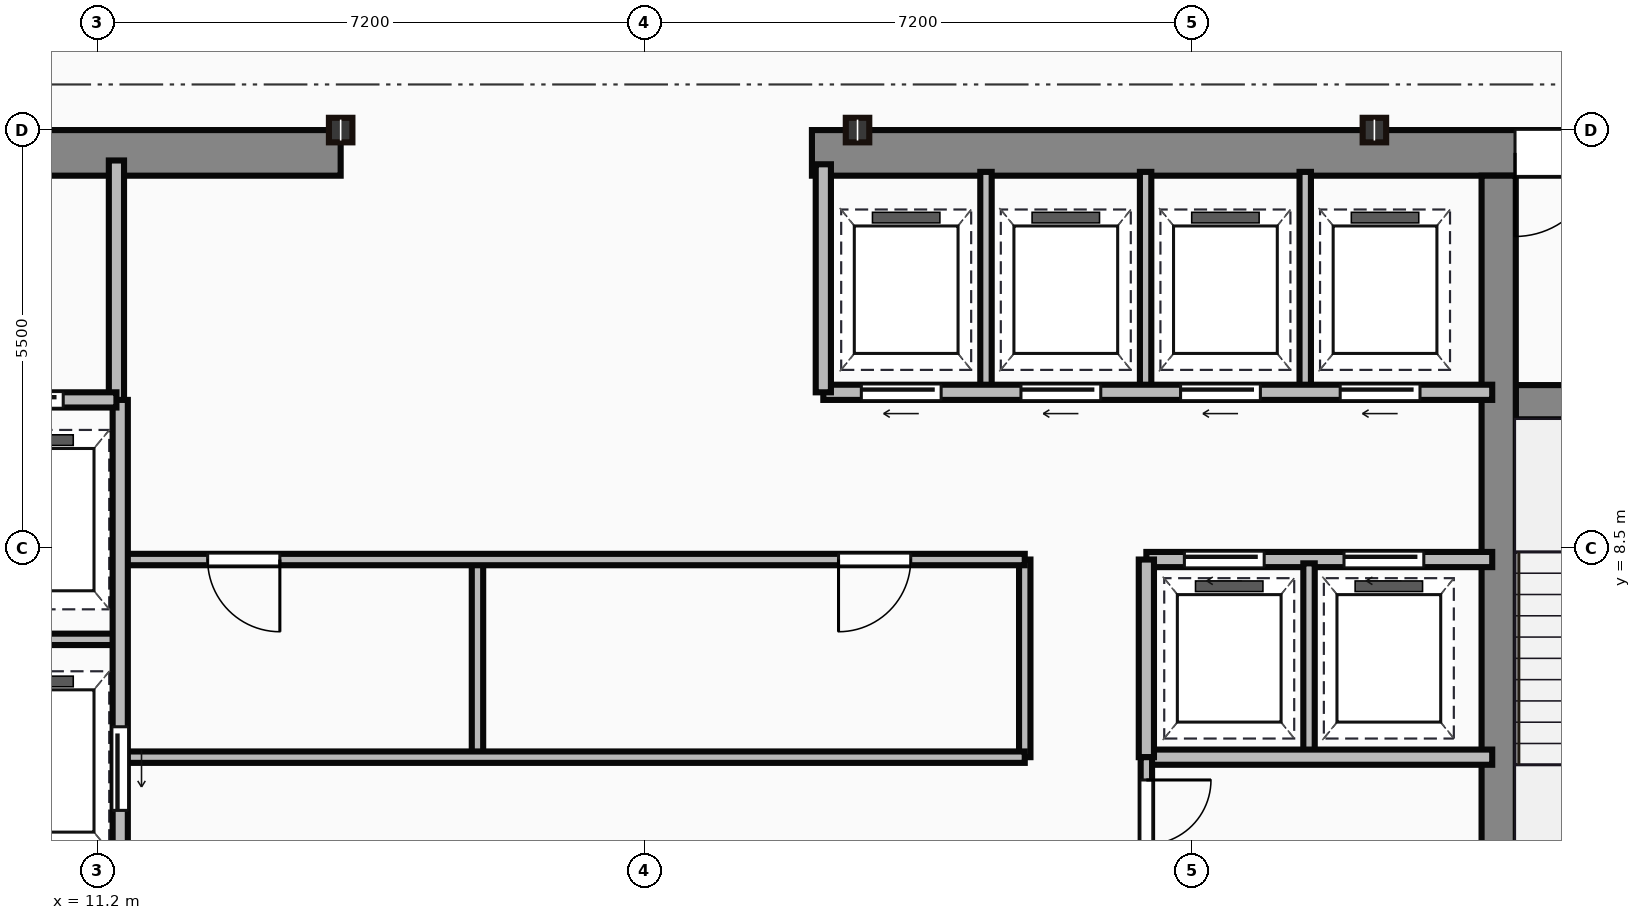
"""IFC4 building model, lengths in metres.
Left out: names, types, materials, properties, quantities, classifications, styles, units other than length and angle.
Written with IfcOpenShell. Run it as: python <this file> out.ifc"""

import sys

from ifc_helpers import new_model, si_unit, direction, frame, frame_2d, origin, origin_2d, place, context, subcontext, project, spatial, rectangle, i_section, extrude, source, transform, mapped, element, fill, save


model = new_model("IFC4")
c1 = context("Model", 3, precision=1e-05, world=origin(), true_north=direction((0.0, 1.0)))
c2 = subcontext(c1, "Body", "Model", "MODEL_VIEW")
j1 = project(units=[si_unit("LENGTHUNIT", "METRE"), si_unit("PLANEANGLEUNIT", "RADIAN")], contexts=[c1])
p1 = place(None, origin())
s1 = spatial("IfcSite", under=j1, at=p1, CompositionType="ELEMENT")
p2 = place(p1, origin())
s2 = spatial("IfcBuilding", under=s1, at=p2, CompositionType="ELEMENT")
p3 = place(p2, frame((0.0, 0.0, 199.55)))
s3 = spatial("IfcBuildingStorey", under=s2, at=p3, CompositionType="ELEMENT", Elevation=199.55)
m1 = source(origin(), c2, "Body", "SweptSolid", [
    extrude(rectangle(XDim=9.1, YDim=0.6, at=frame_2d((4.55, 0.0))), origin(), (0.0, 0.0, 1.0), 3.65),
])
p4 = place(p3, frame((5.3, 13.7, 0.0), z_axis=(0.0, 0.0, 1.0), x_axis=(1.0, 0.0, 0.0)))
e1 = element("IfcWall", 1, at=p4, inside=s3, PredefinedType="SHEAR", context=c2, shape_type="MappedRepresentation", body=[
    mapped(m1, transform((0.0, 0.0, 0.0))),
])
p5 = place(p4, frame((4.1, 0.0, 0.0)))
e2 = element("IfcOpeningElement", 2, at=p5, cuts=e1, PredefinedType="OPENING", context=c2, shape_type="SweptSolid", body=[
    extrude(rectangle(XDim=1.1, YDim=2.15, at=frame_2d((0.55, 1.075))), frame((0.0, 0.31, 0.0), z_axis=(0.0, -1.0, 0.0), x_axis=(1.0, 0.0, 0.0)), (0.0, 0.0, 1.0), 0.62),
])
m2 = source(origin(), c2, "Body", "SweptSolid", [
    extrude(rectangle(XDim=12.6, YDim=0.6, at=frame_2d((6.3, 0.0))), origin(), (0.0, 0.0, 1.0), 3.65),
])
p6 = place(p3, frame((20.6, 13.7, 0.0), z_axis=(0.0, 0.0, 1.0), x_axis=(1.0, 0.0, 0.0)))
e3 = element("IfcWall", 3, at=p6, inside=s3, PredefinedType="SHEAR", context=c2, shape_type="MappedRepresentation", body=[
    mapped(m2, transform((0.0, 0.0, 0.0))),
])
p7 = place(p6, frame((9.25, 0.0, 0.0)))
e4 = element("IfcOpeningElement", 4, at=p7, cuts=e3, PredefinedType="OPENING", context=c2, shape_type="SweptSolid", body=[
    extrude(rectangle(XDim=1.1, YDim=2.15, at=frame_2d((0.55, 1.075))), frame((0.0, 0.31, 0.0), z_axis=(0.0, -1.0, 0.0), x_axis=(1.0, 0.0, 0.0)), (0.0, 0.0, 1.0), 0.62),
])
m3 = source(origin(), c2, "Body", "SweptSolid", [
    extrude(rectangle(XDim=12.5, YDim=0.45, at=frame_2d((6.25, 0.0))), origin(), (0.0, 0.0, 1.0), 3.65),
])
p8 = place(p3, frame((29.635, 0.9, 0.0), z_axis=(0.0, 0.0, 1.0), x_axis=(0.0, 1.0, 0.0)))
e5 = element("IfcWall", 5, at=p8, inside=s3, PredefinedType="SHEAR", context=c2, shape_type="MappedRepresentation", body=[
    mapped(m3, transform((0.0, 0.0, 0.0))),
])
m4 = source(origin(), c2, "Body", "SweptSolid", [
    extrude(rectangle(XDim=3.39, YDim=0.45, at=frame_2d((1.695, 0.0))), origin(), (0.0, 0.0, 1.0), 3.65),
])
p9 = place(p3, frame((29.86, 10.42, 0.0), z_axis=(0.0, 0.0, 1.0), x_axis=(1.0, 0.0, 0.0)))
e6 = element("IfcWall", 6, at=p9, inside=s3, PredefinedType="SHEAR", context=c2, shape_type="MappedRepresentation", body=[
    mapped(m4, transform((0.0, 0.0, 0.0))),
])
p10 = place(p9, frame((1.1, 0.0, 0.0)))
e7 = element("IfcOpeningElement", 7, at=p10, cuts=e6, PredefinedType="OPENING", context=c2, shape_type="SweptSolid", body=[
    extrude(rectangle(XDim=1.1, YDim=2.15, at=frame_2d((0.55, 1.075))), frame((0.0, 0.235, 0.0), z_axis=(0.0, -1.0, 0.0), x_axis=(1.0, 0.0, 0.0)), (0.0, 0.0, 1.0), 0.47),
])
m5 = source(origin(), c2, "Body", "SweptSolid", [
    extrude(i_section(OverallWidth=0.309, OverallDepth=0.323, WebThickness=0.014, FlangeThickness=0.023, at=origin_2d()), origin(), (0.0, 0.0, 1.0), 3.65),
])
for number, where, z_axis, x_axis in (
    (8, (14.4, 14.0, 0.0), (0.0, 0.0, 1.0), (1.0, 0.0, 0.0)),
    (9, (21.2, 14.0, 0.0), (0.0, 0.0, 1.0), (1.0, 0.0, 0.0)),
    (10, (28.0, 14.0, 0.0), (0.0, 0.0, 1.0), (1.0, 0.0, 0.0)),
):
    element("IfcColumn", number, at=place(p3, frame(where, z_axis=z_axis, x_axis=x_axis)), inside=s3, PredefinedType="COLUMN", context=c2, shape_type="MappedRepresentation", body=[
        mapped(m5, transform((0.0, 0.0, 0.0))),
    ])
m6 = source(origin(), c2, "Body", "SweptSolid", [
    extrude(rectangle(XDim=3.18, YDim=0.2, at=frame_2d((1.59, 0.0))), origin(), (0.0, 0.0, 1.0), 3.4),
])
p11 = place(p3, frame((11.45, 10.42, 0.0), z_axis=(0.0, 0.0, 1.0), x_axis=(0.0, 1.0, 0.0)))
e11 = element("IfcWall", 11, at=p11, inside=s3, PredefinedType="PARTITIONING", context=c2, shape_type="MappedRepresentation", body=[
    mapped(m6, transform((0.0, 0.0, 0.0))),
])
m7 = source(origin(), c2, "Body", "SweptSolid", [
    extrude(rectangle(XDim=2.35, YDim=0.2, at=frame_2d((1.175, 0.0))), origin(), (0.0, 0.0, 1.0), 3.4),
])
p12 = place(p3, frame((9.1, 10.45, 0.0), z_axis=(0.0, 0.0, 1.0), x_axis=(1.0, 0.0, 0.0)))
e12 = element("IfcWall", 12, at=p12, inside=s3, PredefinedType="PARTITIONING", context=c2, shape_type="MappedRepresentation", body=[
    mapped(m7, transform((0.0, 0.0, 0.0))),
])
p13 = place(p12, frame((0.55, 0.0, 0.0)))
e13 = element("IfcOpeningElement", 13, at=p13, cuts=e12, PredefinedType="OPENING", context=c2, shape_type="SweptSolid", body=[
    extrude(rectangle(XDim=1.1, YDim=2.15, at=frame_2d((0.55, 1.075))), frame((0.0, 0.11, 0.0), z_axis=(0.0, -1.0, 0.0), x_axis=(1.0, 0.0, 0.0)), (0.0, 0.0, 1.0), 0.22),
])
m8 = source(origin(), c2, "Body", "SweptSolid", [
    extrude(rectangle(XDim=9.6, YDim=0.2, at=frame_2d((4.8, 0.0))), origin(), (0.0, 0.0, 1.0), 3.4),
])
p14 = place(p3, frame((11.5, 0.85, 0.0), z_axis=(0.0, 0.0, 1.0), x_axis=(0.0, 1.0, 0.0)))
e14 = element("IfcWall", 14, at=p14, inside=s3, PredefinedType="PARTITIONING", context=c2, shape_type="MappedRepresentation", body=[
    mapped(m8, transform((0.0, 0.0, 0.0))),
])
p15 = place(p14, frame((4.2, 0.0, 0.0)))
e15 = element("IfcOpeningElement", 15, at=p15, cuts=e14, PredefinedType="OPENING", context=c2, shape_type="SweptSolid", body=[
    extrude(rectangle(XDim=1.1, YDim=2.15, at=frame_2d((0.55, 1.075))), frame((0.0, 0.11, 0.0), z_axis=(0.0, -1.0, 0.0), x_axis=(1.0, 0.0, 0.0)), (0.0, 0.0, 1.0), 0.22),
])
p16 = place(p14, frame((0.9, 0.0, 0.0)))
e16 = element("IfcOpeningElement", 16, at=p16, cuts=e14, PredefinedType="OPENING", context=c2, shape_type="SweptSolid", body=[
    extrude(rectangle(XDim=1.2, YDim=2.15, at=frame_2d((0.6, 1.075))), frame((0.0, 0.11, 0.0), z_axis=(0.0, -1.0, 0.0), x_axis=(1.0, 0.0, 0.0)), (0.0, 0.0, 1.0), 0.22),
])
m9 = source(origin(), c2, "Body", "SweptSolid", [
    extrude(rectangle(XDim=2.4, YDim=0.15, at=frame_2d((1.2, 0.0))), origin(), (0.0, 0.0, 1.0), 3.4),
])
p17 = place(p3, frame((9.1, 7.3, 0.0), z_axis=(0.0, 0.0, 1.0), x_axis=(1.0, 0.0, 0.0)))
e17 = element("IfcWall", 17, at=p17, inside=s3, PredefinedType="PARTITIONING", context=c2, shape_type="MappedRepresentation", body=[
    mapped(m9, transform((0.0, 0.0, 0.0))),
])
m10 = source(origin(), c2, "Body", "SweptSolid", [
    extrude(rectangle(XDim=11.85, YDim=0.15, at=frame_2d((5.925, 0.0))), origin(), (0.0, 0.0, 1.0), 3.4),
])
p18 = place(p3, frame((11.55, 5.75, 0.0), z_axis=(0.0, 0.0, 1.0), x_axis=(1.0, 0.0, 0.0)))
e18 = element("IfcWall", 18, at=p18, inside=s3, PredefinedType="PARTITIONING", context=c2, shape_type="MappedRepresentation", body=[
    mapped(m10, transform((0.0, 0.0, 0.0))),
])
p19 = place(p3, frame((11.55, 8.35, 0.0), z_axis=(0.0, 0.0, 1.0), x_axis=(1.0, 0.0, 0.0)))
e19 = element("IfcWall", 19, at=p19, inside=s3, PredefinedType="PARTITIONING", context=c2, shape_type="MappedRepresentation", body=[
    mapped(m10, transform((0.0, 0.0, 0.0))),
])
p20 = place(p19, frame((1.1, 0.0, 0.0)))
e20 = element("IfcOpeningElement", 20, at=p20, cuts=e19, PredefinedType="OPENING", context=c2, shape_type="SweptSolid", body=[
    extrude(rectangle(XDim=0.95, YDim=2.15, at=frame_2d((0.475, 1.075))), frame((0.0, 0.085, 0.0), z_axis=(0.0, -1.0, 0.0), x_axis=(1.0, 0.0, 0.0)), (0.0, 0.0, 1.0), 0.17),
])
p21 = place(p19, frame((9.4, 0.0, 0.0)))
e21 = element("IfcOpeningElement", 21, at=p21, cuts=e19, PredefinedType="OPENING", context=c2, shape_type="SweptSolid", body=[
    extrude(rectangle(XDim=0.95, YDim=2.15, at=frame_2d((0.475, 1.075))), frame((0.0, 0.085, 0.0), z_axis=(0.0, -1.0, 0.0), x_axis=(1.0, 0.0, 0.0)), (0.0, 0.0, 1.0), 0.17),
])
m11 = source(origin(), c2, "Body", "SweptSolid", [
    extrude(rectangle(XDim=2.6, YDim=0.15, at=frame_2d((1.3, 0.0))), origin(), (0.0, 0.0, 1.0), 3.4),
])
p22 = place(p3, frame((23.4, 5.75, 0.0), z_axis=(0.0, 0.0, 1.0), x_axis=(0.0, 1.0, 0.0)))
e22 = element("IfcWall", 22, at=p22, inside=s3, PredefinedType="PARTITIONING", context=c2, shape_type="MappedRepresentation", body=[
    mapped(m11, transform((0.0, 0.0, 0.0))),
])
m12 = source(origin(), c2, "Body", "SweptSolid", [
    extrude(rectangle(XDim=2.5, YDim=0.15, at=frame_2d((1.25, 0.0))), origin(), (0.0, 0.0, 1.0), 3.4),
])
p23 = place(p3, frame((16.2, 5.8, 0.0), z_axis=(0.0, 0.0, 1.0), x_axis=(0.0, 1.0, 0.0)))
e23 = element("IfcWall", 23, at=p23, inside=s3, PredefinedType="PARTITIONING", context=c2, shape_type="MappedRepresentation", body=[
    mapped(m12, transform((0.0, 0.0, 0.0))),
])
m13 = source(origin(), c2, "Body", "SweptSolid", [
    extrude(rectangle(XDim=8.8, YDim=0.2, at=frame_2d((4.4, 0.0))), origin(), (0.0, 0.0, 1.0), 3.4),
])
p24 = place(p3, frame((20.75, 10.55, 0.0), z_axis=(0.0, 0.0, 1.0), x_axis=(1.0, 0.0, 0.0)))
e24 = element("IfcWall", 24, at=p24, inside=s3, PredefinedType="PARTITIONING", context=c2, shape_type="MappedRepresentation", body=[
    mapped(m13, transform((0.0, 0.0, 0.0))),
])
p25 = place(p24, frame((0.5, 0.0, 0.0)))
e25 = element("IfcOpeningElement", 25, at=p25, cuts=e24, PredefinedType="OPENING", context=c2, shape_type="SweptSolid", body=[
    extrude(rectangle(XDim=1.05, YDim=2.15, at=frame_2d((0.525, 1.075))), frame((0.0, 0.11, 0.0), z_axis=(0.0, -1.0, 0.0), x_axis=(1.0, 0.0, 0.0)), (0.0, 0.0, 1.0), 0.22),
])
p26 = place(p24, frame((2.6, 0.0, 0.0)))
e26 = element("IfcOpeningElement", 26, at=p26, cuts=e24, PredefinedType="OPENING", context=c2, shape_type="SweptSolid", body=[
    extrude(rectangle(XDim=1.05, YDim=2.15, at=frame_2d((0.525, 1.075))), frame((0.0, 0.11, 0.0), z_axis=(0.0, -1.0, 0.0), x_axis=(1.0, 0.0, 0.0)), (0.0, 0.0, 1.0), 0.22),
])
p27 = place(p24, frame((4.7, 0.0, 0.0)))
e27 = element("IfcOpeningElement", 27, at=p27, cuts=e24, PredefinedType="OPENING", context=c2, shape_type="SweptSolid", body=[
    extrude(rectangle(XDim=1.05, YDim=2.15, at=frame_2d((0.525, 1.075))), frame((0.0, 0.11, 0.0), z_axis=(0.0, -1.0, 0.0), x_axis=(1.0, 0.0, 0.0)), (0.0, 0.0, 1.0), 0.22),
])
p28 = place(p24, frame((6.8, 0.0, 0.0)))
e28 = element("IfcOpeningElement", 28, at=p28, cuts=e24, PredefinedType="OPENING", context=c2, shape_type="SweptSolid", body=[
    extrude(rectangle(XDim=1.05, YDim=2.15, at=frame_2d((0.525, 1.075))), frame((0.0, 0.11, 0.0), z_axis=(0.0, -1.0, 0.0), x_axis=(1.0, 0.0, 0.0)), (0.0, 0.0, 1.0), 0.22),
])
m14 = source(origin(), c2, "Body", "SweptSolid", [
    extrude(rectangle(XDim=3.0, YDim=0.2, at=frame_2d((1.5, 0.0))), origin(), (0.0, 0.0, 1.0), 3.4),
])
p29 = place(p3, frame((20.75, 10.55, 0.0), z_axis=(0.0, 0.0, 1.0), x_axis=(0.0, 1.0, 0.0)))
e29 = element("IfcWall", 29, at=p29, inside=s3, PredefinedType="PARTITIONING", context=c2, shape_type="MappedRepresentation", body=[
    mapped(m14, transform((0.0, 0.0, 0.0))),
])
m15 = source(origin(), c2, "Body", "SweptSolid", [
    extrude(rectangle(XDim=2.85, YDim=0.15, at=frame_2d((1.425, 0.0))), origin(), (0.0, 0.0, 1.0), 3.4),
])
for number, where, z_axis, x_axis in (
    (30, (22.89, 10.6, 0.0), (0.0, 0.0, 1.0), (0.0, 1.0, 0.0)),
    (31, (24.99, 10.6, 0.0), (0.0, 0.0, 1.0), (0.0, 1.0, 0.0)),
    (32, (27.09, 10.6, 0.0), (0.0, 0.0, 1.0), (0.0, 1.0, 0.0)),
):
    element("IfcWall", number, at=place(p3, frame(where, z_axis=z_axis, x_axis=x_axis)), inside=s3, PredefinedType="PARTITIONING", context=c2, shape_type="MappedRepresentation", body=[
        mapped(m15, transform((0.0, 0.0, 0.0))),
    ])
m16 = source(origin(), c2, "Body", "SweptSolid", [
    extrude(rectangle(XDim=4.55, YDim=0.2, at=frame_2d((2.275, 0.0))), origin(), (0.0, 0.0, 1.0), 3.4),
])
p30 = place(p3, frame((25.0, 8.35, 0.0), z_axis=(0.0, 0.0, 1.0), x_axis=(1.0, 0.0, 0.0)))
e33 = element("IfcWall", 33, at=p30, inside=s3, PredefinedType="PARTITIONING", context=c2, shape_type="MappedRepresentation", body=[
    mapped(m16, transform((0.0, 0.0, 0.0))),
])
p31 = place(p30, frame((0.5, 0.0, 0.0)))
e34 = element("IfcOpeningElement", 34, at=p31, cuts=e33, PredefinedType="OPENING", context=c2, shape_type="SweptSolid", body=[
    extrude(rectangle(XDim=1.05, YDim=2.15, at=frame_2d((0.525, 1.075))), frame((0.0, 0.11, 0.0), z_axis=(0.0, -1.0, 0.0), x_axis=(1.0, 0.0, 0.0)), (0.0, 0.0, 1.0), 0.22),
])
p32 = place(p30, frame((2.6, 0.0, 0.0)))
e35 = element("IfcOpeningElement", 35, at=p32, cuts=e33, PredefinedType="OPENING", context=c2, shape_type="SweptSolid", body=[
    extrude(rectangle(XDim=1.05, YDim=2.15, at=frame_2d((0.525, 1.075))), frame((0.0, 0.11, 0.0), z_axis=(0.0, -1.0, 0.0), x_axis=(1.0, 0.0, 0.0)), (0.0, 0.0, 1.0), 0.22),
])
p33 = place(p3, frame((25.0, 5.75, 0.0), z_axis=(0.0, 0.0, 1.0), x_axis=(1.0, 0.0, 0.0)))
e36 = element("IfcWall", 36, at=p33, inside=s3, PredefinedType="PARTITIONING", context=c2, shape_type="MappedRepresentation", body=[
    mapped(m16, transform((0.0, 0.0, 0.0))),
])
m17 = source(origin(), c2, "Body", "SweptSolid", [
    extrude(rectangle(XDim=2.6, YDim=0.2, at=frame_2d((1.3, 0.0))), origin(), (0.0, 0.0, 1.0), 3.4),
])
p34 = place(p3, frame((25.0, 5.75, 0.0), z_axis=(0.0, 0.0, 1.0), x_axis=(0.0, 1.0, 0.0)))
e37 = element("IfcWall", 37, at=p34, inside=s3, PredefinedType="PARTITIONING", context=c2, shape_type="MappedRepresentation", body=[
    mapped(m17, transform((0.0, 0.0, 0.0))),
])
p35 = place(p3, frame((27.14, 5.8, 0.0), z_axis=(0.0, 0.0, 1.0), x_axis=(0.0, 1.0, 0.0)))
e38 = element("IfcWall", 38, at=p35, inside=s3, PredefinedType="PARTITIONING", context=c2, shape_type="MappedRepresentation", body=[
    mapped(m12, transform((0.0, 0.0, 0.0))),
])
m18 = source(origin(), c2, "Body", "SweptSolid", [
    extrude(rectangle(XDim=4.9, YDim=0.15, at=frame_2d((2.45, 0.0))), origin(), (0.0, 0.0, 1.0), 3.4),
])
p36 = place(p3, frame((25.0, 0.85, 0.0), z_axis=(0.0, 0.0, 1.0), x_axis=(0.0, 1.0, 0.0)))
e39 = element("IfcWall", 39, at=p36, inside=s3, PredefinedType="PARTITIONING", context=c2, shape_type="MappedRepresentation", body=[
    mapped(m18, transform((0.0, 0.0, 0.0))),
])
p37 = place(p36, frame((2.0, 0.0, 0.0)))
e40 = element("IfcOpeningElement", 40, at=p37, cuts=e39, PredefinedType="OPENING", context=c2, shape_type="SweptSolid", body=[
    extrude(rectangle(XDim=0.95, YDim=2.15, at=frame_2d((0.475, 1.075))), frame((0.0, 0.085, 0.0), z_axis=(0.0, -1.0, 0.0), x_axis=(1.0, 0.0, 0.0)), (0.0, 0.0, 1.0), 0.17),
])
p38 = place(p36, frame((3.75, 0.0, 0.0)))
e41 = element("IfcOpeningElement", 41, at=p38, cuts=e39, PredefinedType="OPENING", context=c2, shape_type="SweptSolid", body=[
    extrude(rectangle(XDim=0.85, YDim=2.15, at=frame_2d((0.425, 1.075))), frame((0.0, 0.085, 0.0), z_axis=(0.0, -1.0, 0.0), x_axis=(1.0, 0.0, 0.0)), (0.0, 0.0, 1.0), 0.17),
])
m19 = source(origin(), c2, "Body", "SweptSolid", [
    extrude(rectangle(XDim=1.1, YDim=2.15, at=frame_2d((0.55, 1.075))), frame((0.0, 0.025, 0.0), z_axis=(0.0, -1.0, 0.0), x_axis=(1.0, 0.0, 0.0)), (0.0, 0.0, 1.0), 0.05),
])
p39 = place(p7, origin())
e42 = element("IfcDoor", 42, at=p39, inside=s3, OperationType="SINGLE_SWING_LEFT", PredefinedType="DOOR", context=c2, shape_type="MappedRepresentation", body=[
    mapped(m19, transform((0.0, 0.0, 0.0))),
])
fill(e4, e42)
p40 = place(p13, origin())
e43 = element("IfcDoor", 43, at=p40, inside=s3, OperationType="SLIDING_TO_LEFT", PredefinedType="DOOR", context=c2, shape_type="MappedRepresentation", body=[
    mapped(m19, transform((0.0, 0.0, 0.0))),
])
fill(e13, e43)
p41 = place(p15, frame((1.1, 0.0, 0.0), z_axis=(0.0, 0.0, 1.0), x_axis=(-1.0, 0.0, 0.0)))
e44 = element("IfcDoor", 44, at=p41, inside=s3, OperationType="SLIDING_TO_LEFT", PredefinedType="DOOR", context=c2, shape_type="MappedRepresentation", body=[
    mapped(m19, transform((0.0, 0.0, 0.0))),
])
fill(e15, e44)
m20 = source(origin(), c2, "Body", "SweptSolid", [
    extrude(rectangle(XDim=0.95, YDim=2.15, at=frame_2d((0.475, 1.075))), frame((0.0, 0.025, 0.0), z_axis=(0.0, -1.0, 0.0), x_axis=(1.0, 0.0, 0.0)), (0.0, 0.0, 1.0), 0.05),
])
p42 = place(p20, origin())
e45 = element("IfcDoor", 45, at=p42, inside=s3, OperationType="SINGLE_SWING_RIGHT", PredefinedType="DOOR", context=c2, shape_type="MappedRepresentation", body=[
    mapped(m20, transform((0.0, 0.0, 0.0))),
])
fill(e20, e45)
p43 = place(p21, origin())
e46 = element("IfcDoor", 46, at=p43, inside=s3, OperationType="SINGLE_SWING_LEFT", PredefinedType="DOOR", context=c2, shape_type="MappedRepresentation", body=[
    mapped(m20, transform((0.0, 0.0, 0.0))),
])
fill(e21, e46)
m21 = source(origin(), c2, "Body", "SweptSolid", [
    extrude(rectangle(XDim=1.05, YDim=2.15, at=frame_2d((0.525, 1.075))), frame((0.0, 0.025, 0.0), z_axis=(0.0, -1.0, 0.0), x_axis=(1.0, 0.0, 0.0)), (0.0, 0.0, 1.0), 0.05),
])
p44 = place(p25, frame((1.05, 0.0, 0.0), z_axis=(0.0, 0.0, 1.0), x_axis=(-1.0, 0.0, 0.0)))
e47 = element("IfcDoor", 47, at=p44, inside=s3, OperationType="SLIDING_TO_LEFT", PredefinedType="DOOR", context=c2, shape_type="MappedRepresentation", body=[
    mapped(m21, transform((0.0, 0.0, 0.0))),
])
fill(e25, e47)
p45 = place(p26, frame((1.05, 0.0, 0.0), z_axis=(0.0, 0.0, 1.0), x_axis=(-1.0, 0.0, 0.0)))
e48 = element("IfcDoor", 48, at=p45, inside=s3, OperationType="SLIDING_TO_LEFT", PredefinedType="DOOR", context=c2, shape_type="MappedRepresentation", body=[
    mapped(m21, transform((0.0, 0.0, 0.0))),
])
fill(e26, e48)
p46 = place(p27, frame((1.05, 0.0, 0.0), z_axis=(0.0, 0.0, 1.0), x_axis=(-1.0, 0.0, 0.0)))
e49 = element("IfcDoor", 49, at=p46, inside=s3, OperationType="SLIDING_TO_LEFT", PredefinedType="DOOR", context=c2, shape_type="MappedRepresentation", body=[
    mapped(m21, transform((0.0, 0.0, 0.0))),
])
fill(e27, e49)
p47 = place(p28, frame((1.05, 0.0, 0.0), z_axis=(0.0, 0.0, 1.0), x_axis=(-1.0, 0.0, 0.0)))
e50 = element("IfcDoor", 50, at=p47, inside=s3, OperationType="SLIDING_TO_LEFT", PredefinedType="DOOR", context=c2, shape_type="MappedRepresentation", body=[
    mapped(m21, transform((0.0, 0.0, 0.0))),
])
fill(e28, e50)
p48 = place(p31, origin())
e51 = element("IfcDoor", 51, at=p48, inside=s3, OperationType="SLIDING_TO_LEFT", PredefinedType="DOOR", context=c2, shape_type="MappedRepresentation", body=[
    mapped(m21, transform((0.0, 0.0, 0.0))),
])
fill(e34, e51)
p49 = place(p32, origin())
e52 = element("IfcDoor", 52, at=p49, inside=s3, OperationType="SLIDING_TO_LEFT", PredefinedType="DOOR", context=c2, shape_type="MappedRepresentation", body=[
    mapped(m21, transform((0.0, 0.0, 0.0))),
])
fill(e35, e52)
m22 = source(origin(), c2, "Body", "SweptSolid", [
    extrude(rectangle(XDim=0.85, YDim=2.15, at=frame_2d((0.425, 1.075))), frame((0.0, 0.025, 0.0), z_axis=(0.0, -1.0, 0.0), x_axis=(1.0, 0.0, 0.0)), (0.0, 0.0, 1.0), 0.05),
])
p50 = place(p38, origin())
e53 = element("IfcDoor", 53, at=p50, inside=s3, OperationType="SINGLE_SWING_RIGHT", PredefinedType="DOOR", context=c2, shape_type="MappedRepresentation", body=[
    mapped(m22, transform((0.0, 0.0, 0.0))),
])
fill(e41, e53)
save(model, sys.argv[1])
